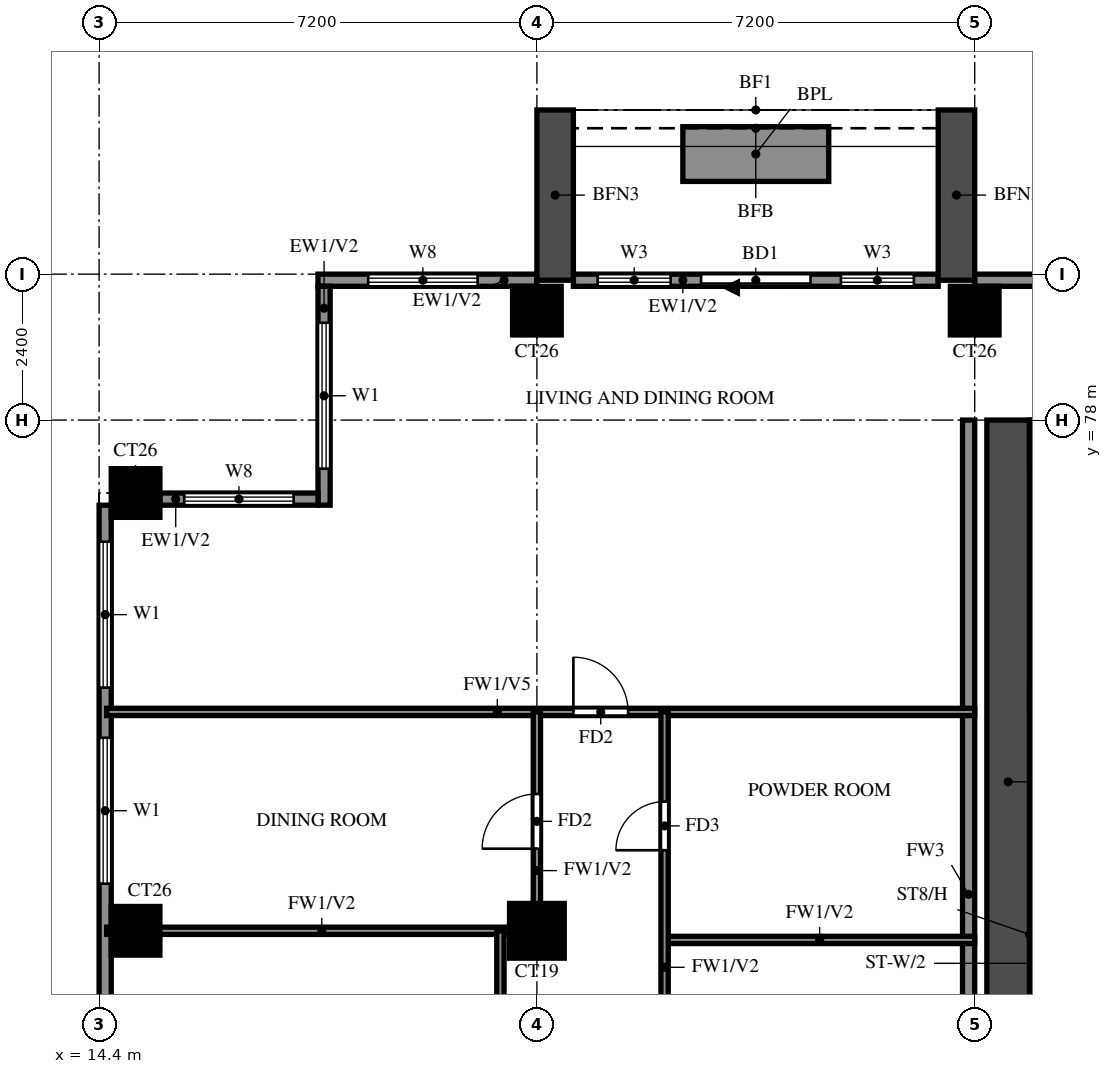
"""IFC4 building model, lengths in metres.
Left out: names, types, materials, properties, quantities, classifications, styles, units other than length and angle.
Written with IfcOpenShell. Run it as: python <this file> out.ifc"""

import sys

from ifc_helpers import new_model, si_unit, direction, frame, frame_2d, origin, origin_2d, place, context, subcontext, project, spatial, rectangle, extrude, source, transform, mapped, element, fill, save


model = new_model("IFC4")
c1 = context("Model", 3, precision=1e-05, world=origin(), true_north=direction((0.0, 1.0)))
c2 = subcontext(c1, "Body", "Model", "MODEL_VIEW")
j1 = project(units=[si_unit("LENGTHUNIT", "METRE"), si_unit("PLANEANGLEUNIT", "RADIAN")], contexts=[c1])
p1 = place(None, origin())
s1 = spatial("IfcSite", under=j1, at=p1, CompositionType="ELEMENT")
p2 = place(p1, origin())
s2 = spatial("IfcBuilding", under=s1, at=p2, CompositionType="ELEMENT")
p3 = place(p2, frame((0.0, 0.0, 199.0)))
s3 = spatial("IfcBuildingStorey", under=s2, at=p3, CompositionType="ELEMENT", Elevation=199.0)
m1 = source(origin(), c2, "Body", "SweptSolid", [
    extrude(rectangle(XDim=0.8, YDim=0.8, at=origin_2d()), origin(), (0.0, 0.0, 1.0), 3.2),
])
p4 = place(p3, frame((15.0, 69.6, 0.0), z_axis=(0.0, 0.0, 1.0), x_axis=(1.0, 0.0, 0.0)))
e1 = element("IfcColumn", 1, at=p4, inside=s3, PredefinedType="COLUMN", context=c2, shape_type="MappedRepresentation", body=[
    mapped(m1, transform((0.0, 0.0, 0.0))),
])
m2 = source(origin(), c2, "Body", "SweptSolid", [
    extrude(rectangle(XDim=0.9, YDim=0.9, at=origin_2d()), origin(), (0.0, 0.0, 1.0), 3.2),
])
p5 = place(p3, frame((21.6, 69.6, 0.0), z_axis=(0.0, 0.0, 1.0), x_axis=(1.0, 0.0, 0.0)))
e2 = element("IfcColumn", 2, at=p5, inside=s3, PredefinedType="COLUMN", context=c2, shape_type="MappedRepresentation", body=[
    mapped(m2, transform((0.0, 0.0, 0.0))),
])
for number, where, z_axis, x_axis in (
    (3, (15.0, 76.8, 0.0), (0.0, 0.0, 1.0), (1.0, 0.0, 0.0)),
    (4, (21.6, 79.8, 0.0), (0.0, 0.0, 1.0), (1.0, 0.0, 0.0)),
    (5, (28.8, 79.8, 0.0), (0.0, 0.0, 1.0), (1.0, 0.0, 0.0)),
):
    element("IfcColumn", number, at=place(p3, frame(where, z_axis=z_axis, x_axis=x_axis)), inside=s3, PredefinedType="COLUMN", context=c2, shape_type="MappedRepresentation", body=[
        mapped(m1, transform((0.0, 0.0, 0.0))),
    ])
p6 = place(p3, frame((29.35, 66.1, 0.0), z_axis=(0.0, 0.0, 1.0), x_axis=(0.0, 1.0, 0.0)))
e6 = element("IfcWall", 6, at=p6, inside=s3, PredefinedType="SHEAR", context=c2, shape_type="SweptSolid", body=[
    extrude(rectangle(XDim=11.9, YDim=0.7, at=frame_2d((5.95, 0.0))), origin(), (0.0, 0.0, 1.0), 3.2),
])
p7 = place(p3, frame((29.7, 77.65, 0.0), z_axis=(0.0, 0.0, 1.0), x_axis=(1.0, 0.0, 0.0)))
e7 = element("IfcWall", 7, at=p7, inside=s3, PredefinedType="SHEAR", context=c2, shape_type="SweptSolid", body=[
    extrude(rectangle(XDim=41.4, YDim=0.7, at=frame_2d((20.7, 0.0))), origin(), (0.0, 0.0, 1.0), 3.2),
])
p8 = place(p3, frame((29.7, 73.425, 0.0), z_axis=(0.0, 0.0, 1.0), x_axis=(1.0, 0.0, 0.0)))
e8 = element("IfcWall", 8, at=p8, inside=s3, PredefinedType="SHEAR", context=c2, shape_type="SweptSolid", body=[
    extrude(rectangle(XDim=3.125, YDim=0.35, at=frame_2d((1.562, 0.0))), origin(), (0.0, 0.0, 1.0), 3.2),
])
p9 = place(p3, frame((82.6, 80.3, 0.0), z_axis=(0.0, 0.0, 1.0), x_axis=(-1.0, 0.0, 0.0)))
e9 = element("IfcWall", 9, at=p9, inside=s3, PredefinedType="SOLIDWALL", context=c2, shape_type="SweptSolid", body=[
    extrude(rectangle(XDim=53.8, YDim=0.2, at=frame_2d((26.9, 0.0))), origin(), (0.0, 0.0, 1.0), 3.2),
])
p10 = place(p9, frame((0.725, 0.0, 0.6)))
e10 = element("IfcOpeningElement", 10, at=p10, cuts=e9, PredefinedType="OPENING", context=c2, shape_type="SweptSolid", body=[
    extrude(rectangle(XDim=1.8, YDim=2.4, at=frame_2d((0.9, 1.2))), frame((0.0, 0.11, 0.0), z_axis=(0.0, -1.0, 0.0), x_axis=(1.0, 0.0, 0.0)), (0.0, 0.0, 1.0), 0.22),
])
p11 = place(p9, frame((4.35, 0.0, 0.6)))
e11 = element("IfcOpeningElement", 11, at=p11, cuts=e9, PredefinedType="OPENING", context=c2, shape_type="SweptSolid", body=[
    extrude(rectangle(XDim=2.4, YDim=2.4, at=frame_2d((1.2, 1.2))), frame((0.0, 0.11, 0.0), z_axis=(0.0, -1.0, 0.0), x_axis=(1.0, 0.0, 0.0)), (0.0, 0.0, 1.0), 0.22),
])
p12 = place(p9, frame((7.25, 0.0, 0.6)))
e12 = element("IfcOpeningElement", 12, at=p12, cuts=e9, PredefinedType="OPENING", context=c2, shape_type="SweptSolid", body=[
    extrude(rectangle(XDim=2.4, YDim=2.4, at=frame_2d((1.2, 1.2))), frame((0.0, 0.11, 0.0), z_axis=(0.0, -1.0, 0.0), x_axis=(1.0, 0.0, 0.0)), (0.0, 0.0, 1.0), 0.22),
])
p13 = place(p3, frame((28.2, 80.3, 0.0), z_axis=(0.0, 0.0, 1.0), x_axis=(-1.0, 0.0, 0.0)))
e13 = element("IfcWall", 13, at=p13, inside=s3, PredefinedType="SOLIDWALL", context=c2, shape_type="SweptSolid", body=[
    extrude(rectangle(XDim=6.0, YDim=0.2, at=frame_2d((3.0, 0.0))), origin(), (0.0, 0.0, 1.0), 3.2),
])
p14 = place(p13, frame((2.1, 0.0, 0.0)))
e14 = element("IfcOpeningElement", 14, at=p14, cuts=e13, PredefinedType="OPENING", context=c2, shape_type="SweptSolid", body=[
    extrude(rectangle(XDim=1.8, YDim=2.4, at=frame_2d((0.9, 1.2))), frame((0.0, 0.11, 0.0), z_axis=(0.0, -1.0, 0.0), x_axis=(1.0, 0.0, 0.0)), (0.0, 0.0, 1.0), 0.22),
])
p15 = place(p13, frame((0.4, 0.0, 0.6)))
e15 = element("IfcOpeningElement", 15, at=p15, cuts=e13, PredefinedType="OPENING", context=c2, shape_type="SweptSolid", body=[
    extrude(rectangle(XDim=1.2, YDim=2.4, at=frame_2d((0.6, 1.2))), frame((0.0, 0.11, 0.0), z_axis=(0.0, -1.0, 0.0), x_axis=(1.0, 0.0, 0.0)), (0.0, 0.0, 1.0), 0.22),
])
p16 = place(p13, frame((4.4, 0.0, 0.6)))
e16 = element("IfcOpeningElement", 16, at=p16, cuts=e13, PredefinedType="OPENING", context=c2, shape_type="SweptSolid", body=[
    extrude(rectangle(XDim=1.2, YDim=2.4, at=frame_2d((0.6, 1.2))), frame((0.0, 0.11, 0.0), z_axis=(0.0, -1.0, 0.0), x_axis=(1.0, 0.0, 0.0)), (0.0, 0.0, 1.0), 0.22),
])
p17 = place(p3, frame((21.6, 80.3, 0.0), z_axis=(0.0, 0.0, 1.0), x_axis=(-1.0, 0.0, 0.0)))
e17 = element("IfcWall", 17, at=p17, inside=s3, PredefinedType="SOLIDWALL", context=c2, shape_type="SweptSolid", body=[
    extrude(rectangle(XDim=3.6, YDim=0.2, at=frame_2d((1.8, 0.0))), origin(), (0.0, 0.0, 1.0), 3.2),
])
p18 = place(p17, frame((0.975, 0.0, 0.6)))
e18 = element("IfcOpeningElement", 18, at=p18, cuts=e17, PredefinedType="OPENING", context=c2, shape_type="SweptSolid", body=[
    extrude(rectangle(XDim=1.8, YDim=2.4, at=frame_2d((0.9, 1.2))), frame((0.0, 0.11, 0.0), z_axis=(0.0, -1.0, 0.0), x_axis=(1.0, 0.0, 0.0)), (0.0, 0.0, 1.0), 0.22),
])
p19 = place(p3, frame((18.1, 80.2, 0.0), z_axis=(0.0, 0.0, 1.0), x_axis=(0.0, -1.0, 0.0)))
e19 = element("IfcWall", 19, at=p19, inside=s3, PredefinedType="SOLIDWALL", context=c2, shape_type="SweptSolid", body=[
    extrude(rectangle(XDim=3.6, YDim=0.2, at=frame_2d((1.8, 0.0))), origin(), (0.0, 0.0, 1.0), 3.2),
])
p20 = place(p19, frame((0.6, 0.0, 0.6)))
e20 = element("IfcOpeningElement", 20, at=p20, cuts=e19, PredefinedType="OPENING", context=c2, shape_type="SweptSolid", body=[
    extrude(rectangle(XDim=2.4, YDim=2.4, at=frame_2d((1.2, 1.2))), frame((0.0, 0.11, 0.0), z_axis=(0.0, -1.0, 0.0), x_axis=(1.0, 0.0, 0.0)), (0.0, 0.0, 1.0), 0.22),
])
p21 = place(p3, frame((18.0, 76.7, 0.0), z_axis=(0.0, 0.0, 1.0), x_axis=(-1.0, 0.0, 0.0)))
e21 = element("IfcWall", 21, at=p21, inside=s3, PredefinedType="SOLIDWALL", context=c2, shape_type="SweptSolid", body=[
    extrude(rectangle(XDim=2.6, YDim=0.2, at=frame_2d((1.3, 0.0))), origin(), (0.0, 0.0, 1.0), 3.2),
])
p22 = place(p21, frame((0.4, 0.0, 0.6)))
e22 = element("IfcOpeningElement", 22, at=p22, cuts=e21, PredefinedType="OPENING", context=c2, shape_type="SweptSolid", body=[
    extrude(rectangle(XDim=1.8, YDim=2.4, at=frame_2d((0.9, 1.2))), frame((0.0, 0.11, 0.0), z_axis=(0.0, -1.0, 0.0), x_axis=(1.0, 0.0, 0.0)), (0.0, 0.0, 1.0), 0.22),
])
p23 = place(p3, frame((14.5, 76.6, 0.0), z_axis=(0.0, 0.0, 1.0), x_axis=(0.0, -1.0, 0.0)))
e23 = element("IfcWall", 23, at=p23, inside=s3, PredefinedType="SOLIDWALL", context=c2, shape_type="SweptSolid", body=[
    extrude(rectangle(XDim=33.4, YDim=0.2, at=frame_2d((16.7, 0.0))), origin(), (0.0, 0.0, 1.0), 3.2),
])
p24 = place(p23, frame((22.3, 0.0, 0.0)))
e24 = element("IfcOpeningElement", 24, at=p24, cuts=e23, PredefinedType="OPENING", context=c2, shape_type="SweptSolid", body=[
    extrude(rectangle(XDim=1.8, YDim=2.4, at=frame_2d((0.9, 1.2))), frame((0.0, 0.11, 0.0), z_axis=(0.0, -1.0, 0.0), x_axis=(1.0, 0.0, 0.0)), (0.0, 0.0, 1.0), 0.22),
])
p25 = place(p23, frame((29.875, 0.0, 0.6)))
e25 = element("IfcOpeningElement", 25, at=p25, cuts=e23, PredefinedType="OPENING", context=c2, shape_type="SweptSolid", body=[
    extrude(rectangle(XDim=2.4, YDim=2.4, at=frame_2d((1.2, 1.2))), frame((0.0, 0.11, 0.0), z_axis=(0.0, -1.0, 0.0), x_axis=(1.0, 0.0, 0.0)), (0.0, 0.0, 1.0), 0.22),
])
p26 = place(p23, frame((26.325, 0.0, 0.6)))
e26 = element("IfcOpeningElement", 26, at=p26, cuts=e23, PredefinedType="OPENING", context=c2, shape_type="SweptSolid", body=[
    extrude(rectangle(XDim=1.8, YDim=2.4, at=frame_2d((0.9, 1.2))), frame((0.0, 0.11, 0.0), z_axis=(0.0, -1.0, 0.0), x_axis=(1.0, 0.0, 0.0)), (0.0, 0.0, 1.0), 0.22),
])
p27 = place(p23, frame((17.95, 0.0, 0.6)))
e27 = element("IfcOpeningElement", 27, at=p27, cuts=e23, PredefinedType="OPENING", context=c2, shape_type="SweptSolid", body=[
    extrude(rectangle(XDim=0.9, YDim=2.4, at=frame_2d((0.45, 1.2))), frame((0.0, 0.11, 0.0), z_axis=(0.0, -1.0, 0.0), x_axis=(1.0, 0.0, 0.0)), (0.0, 0.0, 1.0), 0.22),
])
p28 = place(p23, frame((19.725, 0.0, 0.6)))
e28 = element("IfcOpeningElement", 28, at=p28, cuts=e23, PredefinedType="OPENING", context=c2, shape_type="SweptSolid", body=[
    extrude(rectangle(XDim=1.2, YDim=2.4, at=frame_2d((0.6, 1.2))), frame((0.0, 0.11, 0.0), z_axis=(0.0, -1.0, 0.0), x_axis=(1.0, 0.0, 0.0)), (0.0, 0.0, 1.0), 0.22),
])
p29 = place(p23, frame((14.975, 0.0, 0.6)))
e29 = element("IfcOpeningElement", 29, at=p29, cuts=e23, PredefinedType="OPENING", context=c2, shape_type="SweptSolid", body=[
    extrude(rectangle(XDim=2.4, YDim=2.4, at=frame_2d((1.2, 1.2))), frame((0.0, 0.11, 0.0), z_axis=(0.0, -1.0, 0.0), x_axis=(1.0, 0.0, 0.0)), (0.0, 0.0, 1.0), 0.22),
])
p30 = place(p23, frame((11.025, 0.0, 0.6)))
e30 = element("IfcOpeningElement", 30, at=p30, cuts=e23, PredefinedType="OPENING", context=c2, shape_type="SweptSolid", body=[
    extrude(rectangle(XDim=2.4, YDim=2.4, at=frame_2d((1.2, 1.2))), frame((0.0, 0.11, 0.0), z_axis=(0.0, -1.0, 0.0), x_axis=(1.0, 0.0, 0.0)), (0.0, 0.0, 1.0), 0.22),
])
p31 = place(p23, frame((8.525, 0.0, 1.5)))
e31 = element("IfcOpeningElement", 31, at=p31, cuts=e23, PredefinedType="OPENING", context=c2, shape_type="SweptSolid", body=[
    extrude(rectangle(XDim=0.9, YDim=0.9, at=frame_2d((0.45, 0.45))), frame((0.0, 0.11, 0.0), z_axis=(0.0, -1.0, 0.0), x_axis=(1.0, 0.0, 0.0)), (0.0, 0.0, 1.0), 0.22),
])
p32 = place(p23, frame((3.825, 0.0, 0.6)))
e32 = element("IfcOpeningElement", 32, at=p32, cuts=e23, PredefinedType="OPENING", context=c2, shape_type="SweptSolid", body=[
    extrude(rectangle(XDim=2.4, YDim=2.4, at=frame_2d((1.2, 1.2))), frame((0.0, 0.11, 0.0), z_axis=(0.0, -1.0, 0.0), x_axis=(1.0, 0.0, 0.0)), (0.0, 0.0, 1.0), 0.22),
])
p33 = place(p23, frame((0.6, 0.0, 0.6)))
e33 = element("IfcOpeningElement", 33, at=p33, cuts=e23, PredefinedType="OPENING", context=c2, shape_type="SweptSolid", body=[
    extrude(rectangle(XDim=2.4, YDim=2.4, at=frame_2d((1.2, 1.2))), frame((0.0, 0.11, 0.0), z_axis=(0.0, -1.0, 0.0), x_axis=(1.0, 0.0, 0.0)), (0.0, 0.0, 1.0), 0.22),
])
for number, where, z_axis, x_axis in (
    (34, (28.5, 80.3, 0.0), (0.0, 0.0, 1.0), (0.0, 1.0, 0.0)),
    (35, (21.9, 80.3, 0.0), (0.0, 0.0, 1.0), (0.0, 1.0, 0.0)),
):
    element("IfcWall", number, at=place(p3, frame(where, z_axis=z_axis, x_axis=x_axis)), inside=s3, PredefinedType="SOLIDWALL", context=c2, shape_type="SweptSolid", body=[
        extrude(rectangle(XDim=2.8, YDim=0.6, at=frame_2d((1.4, 0.0))), origin(), (0.0, 0.0, 1.0), 2.85),
    ])
p34 = place(p3, frame((26.4, 82.375, 0.0), z_axis=(0.0, 0.0, 1.0), x_axis=(-1.0, 0.0, 0.0)))
e36 = element("IfcWall", 36, at=p34, inside=s3, PredefinedType="SOLIDWALL", context=c2, shape_type="SweptSolid", body=[
    extrude(rectangle(XDim=2.4, YDim=0.9, at=frame_2d((1.2, 0.0))), origin(), (0.0, 0.0, 1.0), 0.9),
])
p35 = place(p3, frame((28.7, 62.4, 0.0), z_axis=(0.0, 0.0, 1.0), x_axis=(0.0, 1.0, 0.0)))
e37 = element("IfcWall", 37, at=p35, inside=s3, PredefinedType="SOLIDWALL", context=c2, shape_type="SweptSolid", body=[
    extrude(rectangle(XDim=15.6, YDim=0.2, at=frame_2d((7.8, 0.0))), origin(), (0.0, 0.0, 1.0), 3.2),
])
p36 = place(p3, frame((23.7, 69.45, 0.0), z_axis=(0.0, 0.0, 1.0), x_axis=(1.0, 0.0, 0.0)))
e38 = element("IfcWall", 38, at=p36, inside=s3, PredefinedType="PARTITIONING", context=c2, shape_type="SweptSolid", body=[
    extrude(rectangle(XDim=5.1, YDim=0.12, at=frame_2d((2.55, 0.0))), origin(), (0.0, 0.0, 1.0), 3.2),
])
p37 = place(p3, frame((14.525, 69.6, 0.0), z_axis=(0.0, 0.0, 1.0), x_axis=(1.0, 0.0, 0.0)))
e39 = element("IfcWall", 39, at=p37, inside=s3, PredefinedType="PARTITIONING", context=c2, shape_type="SweptSolid", body=[
    extrude(rectangle(XDim=7.075, YDim=0.12, at=frame_2d((3.538, 0.0))), origin(), (0.0, 0.0, 1.0), 3.2),
])
p38 = place(p3, frame((14.525, 73.2, 0.0), z_axis=(0.0, 0.0, 1.0), x_axis=(1.0, 0.0, 0.0)))
e40 = element("IfcWall", 40, at=p38, inside=s3, PredefinedType="PARTITIONING", context=c2, shape_type="SweptSolid", body=[
    extrude(rectangle(XDim=14.275, YDim=0.12, at=frame_2d((7.138, 0.0))), origin(), (0.0, 0.0, 1.0), 2.3),
])
p39 = place(p38, frame((7.675, 0.0, 0.0)))
e41 = element("IfcOpeningElement", 41, at=p39, cuts=e40, PredefinedType="OPENING", context=c2, shape_type="SweptSolid", body=[
    extrude(rectangle(XDim=0.9, YDim=2.1, at=frame_2d((0.45, 1.05))), frame((0.0, 0.07, 0.0), z_axis=(0.0, -1.0, 0.0), x_axis=(1.0, 0.0, 0.0)), (0.0, 0.0, 1.0), 0.14),
])
p40 = place(p3, frame((21.0, 66.0, 0.0), z_axis=(0.0, 0.0, 1.0), x_axis=(0.0, 1.0, 0.0)))
e42 = element("IfcWall", 42, at=p40, inside=s3, PredefinedType="PARTITIONING", context=c2, shape_type="SweptSolid", body=[
    extrude(rectangle(XDim=3.6, YDim=0.12, at=frame_2d((1.8, 0.0))), origin(), (0.0, 0.0, 1.0), 3.2),
])
p41 = place(p3, frame((21.6, 69.6, 0.0), z_axis=(0.0, 0.0, 1.0), x_axis=(0.0, 1.0, 0.0)))
e43 = element("IfcWall", 43, at=p41, inside=s3, PredefinedType="PARTITIONING", context=c2, shape_type="SweptSolid", body=[
    extrude(rectangle(XDim=3.6, YDim=0.12, at=frame_2d((1.8, 0.0))), origin(), (0.0, 0.0, 1.0), 3.2),
])
p42 = place(p41, frame((1.35, 0.0, 0.0)))
e44 = element("IfcOpeningElement", 44, at=p42, cuts=e43, PredefinedType="OPENING", context=c2, shape_type="SweptSolid", body=[
    extrude(rectangle(XDim=0.9, YDim=2.1, at=frame_2d((0.45, 1.05))), frame((0.0, 0.07, 0.0), z_axis=(0.0, -1.0, 0.0), x_axis=(1.0, 0.0, 0.0)), (0.0, 0.0, 1.0), 0.14),
])
p43 = place(p3, frame((23.7, 64.8, 0.0), z_axis=(0.0, 0.0, 1.0), x_axis=(0.0, 1.0, 0.0)))
e45 = element("IfcWall", 45, at=p43, inside=s3, PredefinedType="PARTITIONING", context=c2, shape_type="SweptSolid", body=[
    extrude(rectangle(XDim=8.4, YDim=0.12, at=frame_2d((4.2, 0.0))), origin(), (0.0, 0.0, 1.0), 3.2),
])
p44 = place(p43, frame((6.125, 0.0, 0.0)))
e46 = element("IfcOpeningElement", 46, at=p44, cuts=e45, PredefinedType="OPENING", context=c2, shape_type="SweptSolid", body=[
    extrude(rectangle(XDim=0.8, YDim=2.1, at=frame_2d((0.4, 1.05))), frame((0.0, 0.07, 0.0), z_axis=(0.0, -1.0, 0.0), x_axis=(1.0, 0.0, 0.0)), (0.0, 0.0, 1.0), 0.14),
])
p45 = place(p14, origin())
e47 = element("IfcDoor", 47, at=p45, inside=s3, OperationType="DOUBLE_DOOR_SLIDING", PredefinedType="DOOR", context=c2, shape_type="SweptSolid", body=[
    extrude(rectangle(XDim=1.8, YDim=2.4, at=frame_2d((0.9, 1.2))), frame((0.0, 0.025, 0.0), z_axis=(0.0, -1.0, 0.0), x_axis=(1.0, 0.0, 0.0)), (0.0, 0.0, 1.0), 0.05),
])
fill(e14, e47)
p46 = place(p15, origin())
e48 = element("IfcWindow", 48, at=p46, inside=s3, PartitioningType="SINGLE_PANEL", PredefinedType="WINDOW", context=c2, shape_type="SweptSolid", body=[
    extrude(rectangle(XDim=1.2, YDim=2.4, at=frame_2d((0.6, 1.2))), frame((0.0, 0.03, 0.0), z_axis=(0.0, -1.0, 0.0), x_axis=(1.0, 0.0, 0.0)), (0.0, 0.0, 1.0), 0.06),
])
fill(e15, e48)
p47 = place(p16, origin())
e49 = element("IfcWindow", 49, at=p47, inside=s3, PartitioningType="SINGLE_PANEL", PredefinedType="WINDOW", context=c2, shape_type="SweptSolid", body=[
    extrude(rectangle(XDim=1.2, YDim=2.4, at=frame_2d((0.6, 1.2))), frame((0.0, 0.03, 0.0), z_axis=(0.0, -1.0, 0.0), x_axis=(1.0, 0.0, 0.0)), (0.0, 0.0, 1.0), 0.06),
])
fill(e16, e49)
p48 = place(p18, origin())
e50 = element("IfcWindow", 50, at=p48, inside=s3, PartitioningType="DOUBLE_PANEL_VERTICAL", PredefinedType="WINDOW", context=c2, shape_type="SweptSolid", body=[
    extrude(rectangle(XDim=1.8, YDim=2.4, at=frame_2d((0.9, 1.2))), frame((0.0, 0.03, 0.0), z_axis=(0.0, -1.0, 0.0), x_axis=(1.0, 0.0, 0.0)), (0.0, 0.0, 1.0), 0.06),
])
fill(e18, e50)
p49 = place(p20, origin())
e51 = element("IfcWindow", 51, at=p49, inside=s3, PartitioningType="DOUBLE_PANEL_VERTICAL", PredefinedType="WINDOW", context=c2, shape_type="SweptSolid", body=[
    extrude(rectangle(XDim=2.4, YDim=2.4, at=frame_2d((1.2, 1.2))), frame((0.0, 0.03, 0.0), z_axis=(0.0, -1.0, 0.0), x_axis=(1.0, 0.0, 0.0)), (0.0, 0.0, 1.0), 0.06),
])
fill(e20, e51)
p50 = place(p22, origin())
e52 = element("IfcWindow", 52, at=p50, inside=s3, PartitioningType="DOUBLE_PANEL_VERTICAL", PredefinedType="WINDOW", context=c2, shape_type="SweptSolid", body=[
    extrude(rectangle(XDim=1.8, YDim=2.4, at=frame_2d((0.9, 1.2))), frame((0.0, 0.03, 0.0), z_axis=(0.0, -1.0, 0.0), x_axis=(1.0, 0.0, 0.0)), (0.0, 0.0, 1.0), 0.06),
])
fill(e22, e52)
p51 = place(p32, origin())
e53 = element("IfcWindow", 53, at=p51, inside=s3, PartitioningType="DOUBLE_PANEL_VERTICAL", PredefinedType="WINDOW", context=c2, shape_type="SweptSolid", body=[
    extrude(rectangle(XDim=2.4, YDim=2.4, at=frame_2d((1.2, 1.2))), frame((0.0, 0.03, 0.0), z_axis=(0.0, -1.0, 0.0), x_axis=(1.0, 0.0, 0.0)), (0.0, 0.0, 1.0), 0.06),
])
fill(e32, e53)
p52 = place(p33, origin())
e54 = element("IfcWindow", 54, at=p52, inside=s3, PartitioningType="DOUBLE_PANEL_VERTICAL", PredefinedType="WINDOW", context=c2, shape_type="SweptSolid", body=[
    extrude(rectangle(XDim=2.4, YDim=2.4, at=frame_2d((1.2, 1.2))), frame((0.0, 0.03, 0.0), z_axis=(0.0, -1.0, 0.0), x_axis=(1.0, 0.0, 0.0)), (0.0, 0.0, 1.0), 0.06),
])
fill(e33, e54)
p53 = place(p42, origin())
e55 = element("IfcDoor", 55, at=p53, inside=s3, OperationType="SINGLE_SWING_LEFT", PredefinedType="DOOR", context=c2, shape_type="SweptSolid", body=[
    extrude(rectangle(XDim=0.9, YDim=2.1, at=frame_2d((0.45, 1.05))), frame((0.0, 0.025, 0.0), z_axis=(0.0, -1.0, 0.0), x_axis=(1.0, 0.0, 0.0)), (0.0, 0.0, 1.0), 0.05),
])
fill(e44, e55)
p54 = place(p39, origin())
e56 = element("IfcDoor", 56, at=p54, inside=s3, OperationType="SINGLE_SWING_RIGHT", PredefinedType="DOOR", context=c2, shape_type="SweptSolid", body=[
    extrude(rectangle(XDim=0.9, YDim=2.1, at=frame_2d((0.45, 1.05))), frame((0.0, 0.025, 0.0), z_axis=(0.0, -1.0, 0.0), x_axis=(1.0, 0.0, 0.0)), (0.0, 0.0, 1.0), 0.05),
])
fill(e41, e56)
p55 = place(p44, origin())
e57 = element("IfcDoor", 57, at=p55, inside=s3, OperationType="SINGLE_SWING_LEFT", PredefinedType="DOOR", context=c2, shape_type="SweptSolid", body=[
    extrude(rectangle(XDim=0.8, YDim=2.1, at=frame_2d((0.4, 1.05))), frame((0.0, 0.025, 0.0), z_axis=(0.0, -1.0, 0.0), x_axis=(1.0, 0.0, 0.0)), (0.0, 0.0, 1.0), 0.05),
])
fill(e46, e57)
save(model, sys.argv[1])
